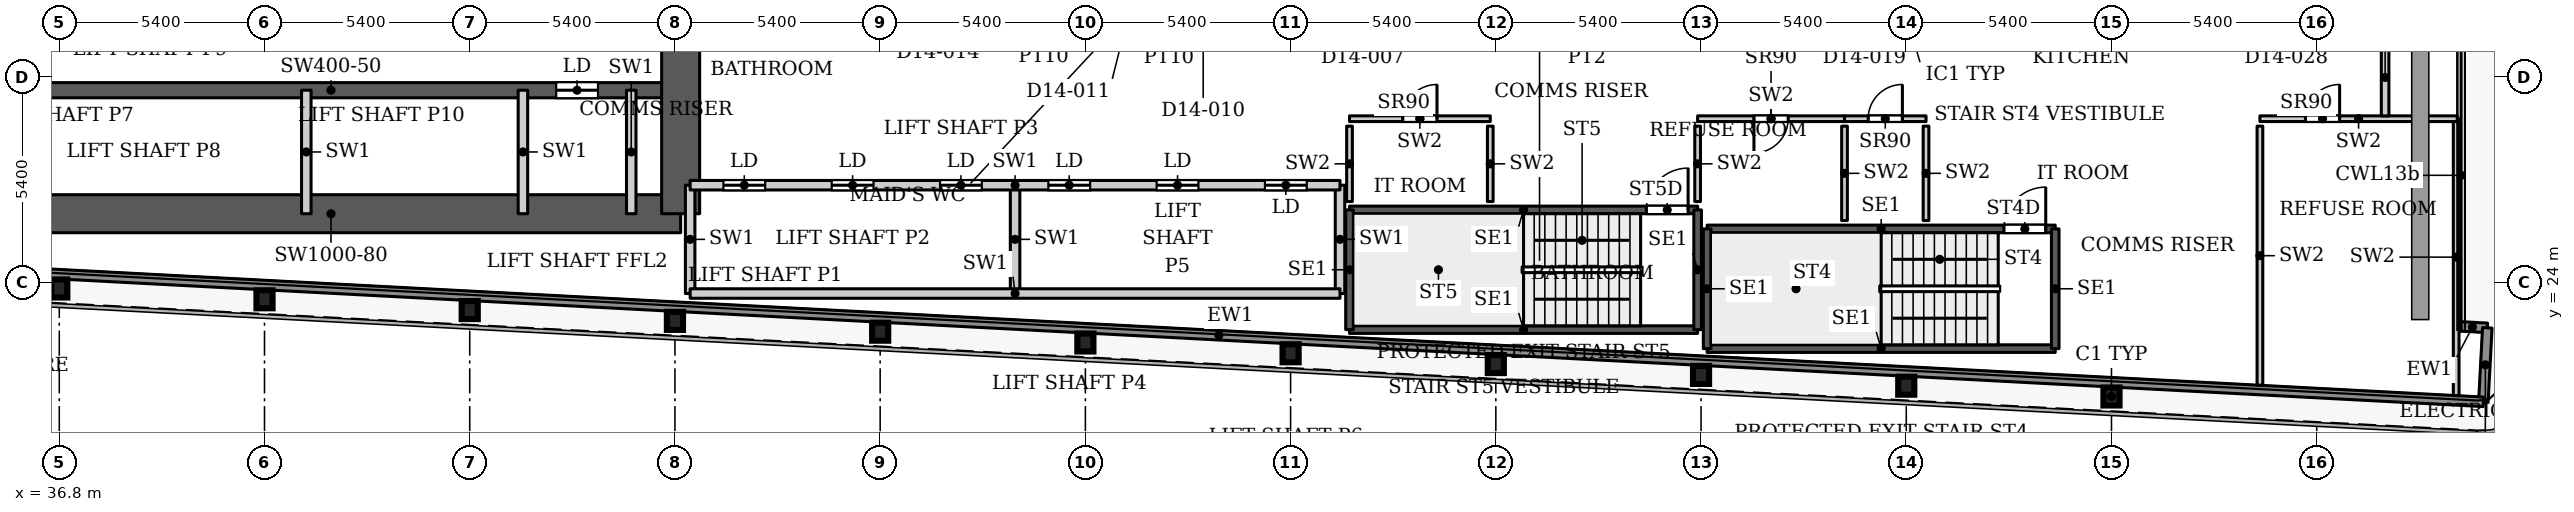
"""IFC4 building model, lengths in metres.
Left out: names, types, materials, properties, quantities, classifications, styles, units other than length and angle.
Written with IfcOpenShell. Run it as: python <this file> out.ifc"""

import sys

from ifc_helpers import new_model, si_unit, direction, frame, frame_2d, origin, origin_2d, place, context, subcontext, project, spatial, rectangle, i_section, extrude, source, transform, mapped, element, fill, save


model = new_model("IFC4")
c1 = context("Model", 3, precision=1e-05, world=origin(), true_north=direction((0.0, 1.0)))
c2 = subcontext(c1, "Body", "Model", "MODEL_VIEW")
j1 = project(units=[si_unit("LENGTHUNIT", "METRE"), si_unit("PLANEANGLEUNIT", "RADIAN")], contexts=[c1])
p1 = place(None, origin())
s1 = spatial("IfcSite", under=j1, at=p1, CompositionType="ELEMENT")
p2 = place(p1, origin())
s2 = spatial("IfcBuilding", under=s1, at=p2, CompositionType="ELEMENT")
p3 = place(p2, frame((0.0, 0.0, 61.7)))
s3 = spatial("IfcBuildingStorey", under=s2, at=p3, CompositionType="ELEMENT", Elevation=61.7)
for number, where, z_axis, x_axis in (
    (1, (90.8, 20.99, 0.0), (0.0, 0.0, 1.0), (1.0, 0.0, 0.0)),
    (2, (85.4, 21.274, 0.0), (0.0, 0.0, 1.0), (1.0, 0.0, 0.0)),
    (3, (80.0, 21.558, 0.0), (0.0, 0.0, 1.0), (1.0, 0.0, 0.0)),
    (4, (74.6, 21.843, 0.0), (0.0, 0.0, 1.0), (1.0, 0.0, 0.0)),
    (5, (69.2, 22.127, 0.0), (0.0, 0.0, 1.0), (1.0, 0.0, 0.0)),
    (6, (63.8, 22.411, 0.0), (0.0, 0.0, 1.0), (1.0, 0.0, 0.0)),
    (7, (58.4, 22.695, 0.0), (0.0, 0.0, 1.0), (1.0, 0.0, 0.0)),
    (8, (53.0, 22.98, 0.0), (0.0, 0.0, 1.0), (1.0, 0.0, 0.0)),
    (9, (47.6, 23.264, 0.0), (0.0, 0.0, 1.0), (1.0, 0.0, 0.0)),
    (10, (42.2, 23.548, 0.0), (0.0, 0.0, 1.0), (1.0, 0.0, 0.0)),
    (11, (36.8, 23.832, 0.0), (0.0, 0.0, 1.0), (1.0, 0.0, 0.0)),
):
    element("IfcColumn", number, at=place(p3, frame(where, z_axis=z_axis, x_axis=x_axis)), inside=s3, PredefinedType="COLUMN", context=c2, shape_type="SweptSolid", body=[
        extrude(i_section(OverallWidth=0.424, OverallDepth=0.474, WebThickness=0.048, FlangeThickness=0.077, FilletRadius=0.014, at=origin_2d()), origin(), (0.0, 0.0, 1.0), 3.9),
    ])
p4 = place(p3, frame((34.75, 25.8, 0.0), z_axis=(0.0, 0.0, 1.0), x_axis=(1.0, 0.0, 0.0)))
e12 = element("IfcWall", 12, at=p4, inside=s3, PredefinedType="SHEAR", context=c2, shape_type="SweptSolid", body=[
    extrude(rectangle(XDim=18.4, YDim=1.0, at=frame_2d((9.2, 0.0))), origin(), (0.0, 0.0, 1.0), 3.9),
])
p5 = place(p3, frame((34.75, 29.05, 0.0), z_axis=(0.0, 0.0, 1.0), x_axis=(1.0, 0.0, 0.0)))
e13 = element("IfcWall", 13, at=p5, inside=s3, PredefinedType="SHEAR", context=c2, shape_type="SweptSolid", body=[
    extrude(rectangle(XDim=18.4, YDim=0.4, at=frame_2d((9.2, 0.0))), origin(), (0.0, 0.0, 1.0), 3.9),
])
p6 = place(p5, frame((15.125, 0.0, 0.0)))
e14 = element("IfcOpeningElement", 14, at=p6, cuts=e13, PredefinedType="OPENING", context=c2, shape_type="SweptSolid", body=[
    extrude(rectangle(XDim=1.1, YDim=2.2, at=frame_2d((0.55, 1.1))), frame((0.0, 0.21, 0.0), z_axis=(0.0, -1.0, 0.0), x_axis=(1.0, 0.0, 0.0)), (0.0, 0.0, 1.0), 0.42),
])
p7 = place(p3, frame((53.15, 25.8, 0.0), z_axis=(0.0, 0.0, 1.0), x_axis=(0.0, 1.0, 0.0)))
e15 = element("IfcWall", 15, at=p7, inside=s3, PredefinedType="SHEAR", context=c2, shape_type="SweptSolid", body=[
    extrude(rectangle(XDim=10.4, YDim=1.0, at=frame_2d((5.2, 0.0))), origin(), (0.0, 0.0, 1.0), 3.9),
])
p8 = place(p3, frame((99.907, 22.839, 0.0), z_axis=(0.0, 0.0, 1.0), x_axis=(0.998561284263, -0.053622398031, 0.0)))
e16 = element("IfcWall", 16, at=p8, inside=s3, PredefinedType="SOLIDWALL", context=c2, shape_type="SweptSolid", body=[
    extrude(rectangle(XDim=0.783, YDim=0.25, at=frame_2d((0.392, 0.0))), origin(), (0.0, 0.0, 1.0), 3.75),
])
p9 = place(p3, frame((100.689, 22.797, 0.0), z_axis=(0.0, 0.0, 1.0), x_axis=(-0.052841433274, -0.998602915542, 0.0)))
e17 = element("IfcWall", 17, at=p9, inside=s3, PredefinedType="SOLIDWALL", context=c2, shape_type="SweptSolid", body=[
    extrude(rectangle(XDim=1.95, YDim=0.25, at=frame_2d((0.975, 0.0))), origin(), (0.0, 0.0, 1.0), 3.75),
])
p10 = place(p3, frame((100.586, 20.85, 0.0), z_axis=(0.0, 0.0, 1.0), x_axis=(-0.99861746497, 0.052565755559, 0.0)))
e18 = element("IfcWall", 18, at=p10, inside=s3, PredefinedType="SOLIDWALL", context=c2, shape_type="SweptSolid", body=[
    extrude(rectangle(XDim=66.639, YDim=0.25, at=frame_2d((33.319, 0.0))), origin(), (0.0, 0.0, 1.0), 3.75),
])
p11 = place(p3, frame((80.16, 22.25, 0.0), z_axis=(0.0, 0.0, 1.0), x_axis=(1.0, 0.0, 0.0)))
e19 = element("IfcWall", 19, at=p11, inside=s3, PredefinedType="SHEAR", context=c2, shape_type="SweptSolid", body=[
    extrude(rectangle(XDim=9.16, YDim=0.2, at=frame_2d((4.58, 0.0))), origin(), (0.0, 0.0, 1.0), 3.9),
])
p12 = place(p3, frame((80.16, 25.4, 0.0), z_axis=(0.0, 0.0, 1.0), x_axis=(1.0, 0.0, 0.0)))
e20 = element("IfcWall", 20, at=p12, inside=s3, PredefinedType="SHEAR", context=c2, shape_type="SweptSolid", body=[
    extrude(rectangle(XDim=9.16, YDim=0.2, at=frame_2d((4.58, 0.0))), origin(), (0.0, 0.0, 1.0), 3.9),
])
p13 = place(p12, frame((7.81, 0.0, 0.0)))
e21 = element("IfcOpeningElement", 21, at=p13, cuts=e20, PredefinedType="OPENING", context=c2, shape_type="SweptSolid", body=[
    extrude(rectangle(XDim=1.1, YDim=2.2, at=frame_2d((0.55, 1.1))), frame((0.0, 0.11, 0.0), z_axis=(0.0, -1.0, 0.0), x_axis=(1.0, 0.0, 0.0)), (0.0, 0.0, 1.0), 0.22),
])
for number, where, z_axis, x_axis in (
    (22, (80.16, 22.25, 0.0), (0.0, 0.0, 1.0), (0.0, 1.0, 0.0)),
    (23, (89.32, 22.25, 0.0), (0.0, 0.0, 1.0), (0.0, 1.0, 0.0)),
):
    element("IfcWall", number, at=place(p3, frame(where, z_axis=z_axis, x_axis=x_axis)), inside=s3, PredefinedType="SHEAR", context=c2, shape_type="SweptSolid", body=[
        extrude(rectangle(XDim=3.15, YDim=0.2, at=frame_2d((1.575, 0.0))), origin(), (0.0, 0.0, 1.0), 3.9),
    ])
p14 = place(p3, frame((70.75, 22.75, 0.0), z_axis=(0.0, 0.0, 1.0), x_axis=(1.0, 0.0, 0.0)))
e24 = element("IfcWall", 24, at=p14, inside=s3, PredefinedType="SHEAR", context=c2, shape_type="SweptSolid", body=[
    extrude(rectangle(XDim=9.16, YDim=0.2, at=frame_2d((4.58, 0.0))), origin(), (0.0, 0.0, 1.0), 3.9),
])
p15 = place(p3, frame((70.75, 25.9, 0.0), z_axis=(0.0, 0.0, 1.0), x_axis=(1.0, 0.0, 0.0)))
e25 = element("IfcWall", 25, at=p15, inside=s3, PredefinedType="SHEAR", context=c2, shape_type="SweptSolid", body=[
    extrude(rectangle(XDim=9.16, YDim=0.2, at=frame_2d((4.58, 0.0))), origin(), (0.0, 0.0, 1.0), 3.9),
])
p16 = place(p15, frame((7.81, 0.0, 0.0)))
e26 = element("IfcOpeningElement", 26, at=p16, cuts=e25, PredefinedType="OPENING", context=c2, shape_type="SweptSolid", body=[
    extrude(rectangle(XDim=1.1, YDim=2.2, at=frame_2d((0.55, 1.1))), frame((0.0, 0.11, 0.0), z_axis=(0.0, -1.0, 0.0), x_axis=(1.0, 0.0, 0.0)), (0.0, 0.0, 1.0), 0.22),
])
for number, where, z_axis, x_axis in (
    (27, (70.75, 22.75, 0.0), (0.0, 0.0, 1.0), (0.0, 1.0, 0.0)),
    (28, (79.91, 22.75, 0.0), (0.0, 0.0, 1.0), (0.0, 1.0, 0.0)),
):
    element("IfcWall", number, at=place(p3, frame(where, z_axis=z_axis, x_axis=x_axis)), inside=s3, PredefinedType="SHEAR", context=c2, shape_type="SweptSolid", body=[
        extrude(rectangle(XDim=3.15, YDim=0.2, at=frame_2d((1.575, 0.0))), origin(), (0.0, 0.0, 1.0), 3.9),
    ])
for number, where, z_axis, x_axis in (
    (29, (43.3, 25.8, 0.0), (0.0, 0.0, 1.0), (0.0, 1.0, 0.0)),
    (30, (49.0, 25.8, 0.0), (0.0, 0.0, 1.0), (0.0, 1.0, 0.0)),
    (31, (51.85, 25.8, 0.0), (0.0, 0.0, 1.0), (0.0, 1.0, 0.0)),
):
    element("IfcWall", number, at=place(p3, frame(where, z_axis=z_axis, x_axis=x_axis)), inside=s3, PredefinedType="PARTITIONING", context=c2, shape_type="SweptSolid", body=[
        extrude(rectangle(XDim=3.25, YDim=0.25, at=frame_2d((1.625, 0.0))), origin(), (0.0, 0.0, 1.0), 3.9),
    ])
for number, where, z_axis, x_axis in (
    (32, (53.4, 23.7, 0.0), (0.0, 0.0, 1.0), (0.0, 1.0, 0.0)),
    (33, (61.95, 23.7, 0.0), (0.0, 0.0, 1.0), (0.0, 1.0, 0.0)),
    (34, (70.5, 23.7, 0.0), (0.0, 0.0, 1.0), (0.0, 1.0, 0.0)),
):
    element("IfcWall", number, at=place(p3, frame(where, z_axis=z_axis, x_axis=x_axis)), inside=s3, PredefinedType="PARTITIONING", context=c2, shape_type="SweptSolid", body=[
        extrude(rectangle(XDim=2.85, YDim=0.25, at=frame_2d((1.425, 0.0))), origin(), (0.0, 0.0, 1.0), 3.9),
    ])
p17 = place(p3, frame((53.4, 23.7, 0.0), z_axis=(0.0, 0.0, 1.0), x_axis=(1.0, 0.0, 0.0)))
e35 = element("IfcWall", 35, at=p17, inside=s3, PredefinedType="PARTITIONING", context=c2, shape_type="SweptSolid", body=[
    extrude(rectangle(XDim=17.1, YDim=0.25, at=frame_2d((8.55, 0.0))), origin(), (0.0, 0.0, 1.0), 3.9),
])
p18 = place(p3, frame((53.4, 26.55, 0.0), z_axis=(0.0, 0.0, 1.0), x_axis=(1.0, 0.0, 0.0)))
e36 = element("IfcWall", 36, at=p18, inside=s3, PredefinedType="PARTITIONING", context=c2, shape_type="SweptSolid", body=[
    extrude(rectangle(XDim=17.1, YDim=0.25, at=frame_2d((8.55, 0.0))), origin(), (0.0, 0.0, 1.0), 3.9),
])
p19 = place(p18, frame((0.875, 0.0, 0.0)))
e37 = element("IfcOpeningElement", 37, at=p19, cuts=e36, PredefinedType="OPENING", context=c2, shape_type="SweptSolid", body=[
    extrude(rectangle(XDim=1.1, YDim=2.2, at=frame_2d((0.55, 1.1))), frame((0.0, 0.135, 0.0), z_axis=(0.0, -1.0, 0.0), x_axis=(1.0, 0.0, 0.0)), (0.0, 0.0, 1.0), 0.27),
])
p20 = place(p18, frame((3.725, 0.0, 0.0)))
e38 = element("IfcOpeningElement", 38, at=p20, cuts=e36, PredefinedType="OPENING", context=c2, shape_type="SweptSolid", body=[
    extrude(rectangle(XDim=1.1, YDim=2.2, at=frame_2d((0.55, 1.1))), frame((0.0, 0.135, 0.0), z_axis=(0.0, -1.0, 0.0), x_axis=(1.0, 0.0, 0.0)), (0.0, 0.0, 1.0), 0.27),
])
p21 = place(p18, frame((6.575, 0.0, 0.0)))
e39 = element("IfcOpeningElement", 39, at=p21, cuts=e36, PredefinedType="OPENING", context=c2, shape_type="SweptSolid", body=[
    extrude(rectangle(XDim=1.1, YDim=2.2, at=frame_2d((0.55, 1.1))), frame((0.0, 0.135, 0.0), z_axis=(0.0, -1.0, 0.0), x_axis=(1.0, 0.0, 0.0)), (0.0, 0.0, 1.0), 0.27),
])
p22 = place(p18, frame((9.425, 0.0, 0.0)))
e40 = element("IfcOpeningElement", 40, at=p22, cuts=e36, PredefinedType="OPENING", context=c2, shape_type="SweptSolid", body=[
    extrude(rectangle(XDim=1.1, YDim=2.2, at=frame_2d((0.55, 1.1))), frame((0.0, 0.135, 0.0), z_axis=(0.0, -1.0, 0.0), x_axis=(1.0, 0.0, 0.0)), (0.0, 0.0, 1.0), 0.27),
])
p23 = place(p18, frame((12.275, 0.0, 0.0)))
e41 = element("IfcOpeningElement", 41, at=p23, cuts=e36, PredefinedType="OPENING", context=c2, shape_type="SweptSolid", body=[
    extrude(rectangle(XDim=1.1, YDim=2.2, at=frame_2d((0.55, 1.1))), frame((0.0, 0.135, 0.0), z_axis=(0.0, -1.0, 0.0), x_axis=(1.0, 0.0, 0.0)), (0.0, 0.0, 1.0), 0.27),
])
p24 = place(p18, frame((15.125, 0.0, 0.0)))
e42 = element("IfcOpeningElement", 42, at=p24, cuts=e36, PredefinedType="OPENING", context=c2, shape_type="SweptSolid", body=[
    extrude(rectangle(XDim=1.1, YDim=2.2, at=frame_2d((0.55, 1.1))), frame((0.0, 0.135, 0.0), z_axis=(0.0, -1.0, 0.0), x_axis=(1.0, 0.0, 0.0)), (0.0, 0.0, 1.0), 0.27),
])
p25 = place(p3, frame((70.75, 28.3, 0.0), z_axis=(0.0, 0.0, 1.0), x_axis=(1.0, 0.0, 0.0)))
e43 = element("IfcWall", 43, at=p25, inside=s3, PredefinedType="PARTITIONING", context=c2, shape_type="SweptSolid", body=[
    extrude(rectangle(XDim=3.704, YDim=0.15, at=frame_2d((1.852, 0.0))), origin(), (0.0, 0.0, 1.0), 3.9),
])
p26 = place(p25, frame((1.402, 0.0, 0.0)))
e44 = element("IfcOpeningElement", 44, at=p26, cuts=e43, PredefinedType="OPENING", context=c2, shape_type="SweptSolid", body=[
    extrude(rectangle(XDim=0.9, YDim=2.2, at=frame_2d((0.45, 1.1))), frame((0.0, 0.085, 0.0), z_axis=(0.0, -1.0, 0.0), x_axis=(1.0, 0.0, 0.0)), (0.0, 0.0, 1.0), 0.17),
])
for number, where, z_axis, x_axis in (
    (45, (70.75, 26.12, 0.0), (0.0, 0.0, 1.0), (0.0, 1.0, 0.0)),
    (46, (74.454, 26.12, 0.0), (0.0, 0.0, 1.0), (0.0, 1.0, 0.0)),
):
    element("IfcWall", number, at=place(p3, frame(where, z_axis=z_axis, x_axis=x_axis)), inside=s3, PredefinedType="PARTITIONING", context=c2, shape_type="SweptSolid", body=[
        extrude(rectangle(XDim=1.985, YDim=0.15, at=frame_2d((0.992, 0.0))), origin(), (0.0, 0.0, 1.0), 3.9),
    ])
p27 = place(p3, frame((79.91, 28.3, 0.0), z_axis=(0.0, 0.0, 1.0), x_axis=(1.0, 0.0, 0.0)))
e47 = element("IfcWall", 47, at=p27, inside=s3, PredefinedType="PARTITIONING", context=c2, shape_type="SweptSolid", body=[
    extrude(rectangle(XDim=3.865, YDim=0.15, at=frame_2d((1.933, 0.0))), origin(), (0.0, 0.0, 1.0), 3.9),
])
p28 = place(p27, frame((1.482, 0.0, 0.0)))
e48 = element("IfcOpeningElement", 48, at=p28, cuts=e47, PredefinedType="OPENING", context=c2, shape_type="SweptSolid", body=[
    extrude(rectangle(XDim=0.9, YDim=2.2, at=frame_2d((0.45, 1.1))), frame((0.0, 0.085, 0.0), z_axis=(0.0, -1.0, 0.0), x_axis=(1.0, 0.0, 0.0)), (0.0, 0.0, 1.0), 0.17),
])
p29 = place(p3, frame((79.91, 26.12, 0.0), z_axis=(0.0, 0.0, 1.0), x_axis=(0.0, 1.0, 0.0)))
e49 = element("IfcWall", 49, at=p29, inside=s3, PredefinedType="PARTITIONING", context=c2, shape_type="SweptSolid", body=[
    extrude(rectangle(XDim=1.985, YDim=0.15, at=frame_2d((0.992, 0.0))), origin(), (0.0, 0.0, 1.0), 3.9),
])
p30 = place(p3, frame((83.775, 25.62, 0.0), z_axis=(0.0, 0.0, 1.0), x_axis=(0.0, 1.0, 0.0)))
e50 = element("IfcWall", 50, at=p30, inside=s3, PredefinedType="PARTITIONING", context=c2, shape_type="SweptSolid", body=[
    extrude(rectangle(XDim=2.485, YDim=0.15, at=frame_2d((1.242, 0.0))), origin(), (0.0, 0.0, 1.0), 3.9),
])
p31 = place(p3, frame((83.775, 28.3, 0.0), z_axis=(0.0, 0.0, 1.0), x_axis=(1.0, 0.0, 0.0)))
e51 = element("IfcWall", 51, at=p31, inside=s3, PredefinedType="PARTITIONING", context=c2, shape_type="SweptSolid", body=[
    extrude(rectangle(XDim=2.145, YDim=0.15, at=frame_2d((1.073, 0.0))), origin(), (0.0, 0.0, 1.0), 3.9),
])
p32 = place(p31, frame((0.623, 0.0, 0.0)))
e52 = element("IfcOpeningElement", 52, at=p32, cuts=e51, PredefinedType="OPENING", context=c2, shape_type="SweptSolid", body=[
    extrude(rectangle(XDim=0.9, YDim=2.2, at=frame_2d((0.45, 1.1))), frame((0.0, 0.085, 0.0), z_axis=(0.0, -1.0, 0.0), x_axis=(1.0, 0.0, 0.0)), (0.0, 0.0, 1.0), 0.17),
])
p33 = place(p3, frame((85.92, 25.62, 0.0), z_axis=(0.0, 0.0, 1.0), x_axis=(0.0, 1.0, 0.0)))
e53 = element("IfcWall", 53, at=p33, inside=s3, PredefinedType="PARTITIONING", context=c2, shape_type="SweptSolid", body=[
    extrude(rectangle(XDim=2.485, YDim=0.15, at=frame_2d((1.242, 0.0))), origin(), (0.0, 0.0, 1.0), 3.9),
])
p34 = place(p3, frame((99.87, 21.015, 0.0), z_axis=(0.0, 0.0, 1.0), x_axis=(0.0, 1.0, 0.0)))
e54 = element("IfcWall", 54, at=p34, inside=s3, PredefinedType="PARTITIONING", context=c2, shape_type="SweptSolid", body=[
    extrude(rectangle(XDim=7.285, YDim=0.15, at=frame_2d((3.643, 0.0))), origin(), (0.0, 0.0, 1.0), 3.9),
])
p35 = place(p3, frame((94.706, 28.3, 0.0), z_axis=(0.0, 0.0, 1.0), x_axis=(1.0, 0.0, 0.0)))
e55 = element("IfcWall", 55, at=p35, inside=s3, PredefinedType="PARTITIONING", context=c2, shape_type="SweptSolid", body=[
    extrude(rectangle(XDim=5.192, YDim=0.15, at=frame_2d((2.596, 0.0))), origin(), (0.0, 0.0, 1.0), 3.9),
])
p36 = place(p35, frame((1.197, 0.0, 0.0)))
e56 = element("IfcOpeningElement", 56, at=p36, cuts=e55, PredefinedType="OPENING", context=c2, shape_type="SweptSolid", body=[
    extrude(rectangle(XDim=0.9, YDim=2.2, at=frame_2d((0.45, 1.1))), frame((0.0, 0.085, 0.0), z_axis=(0.0, -1.0, 0.0), x_axis=(1.0, 0.0, 0.0)), (0.0, 0.0, 1.0), 0.17),
])
p37 = place(p3, frame((94.706, 21.287, 0.0), z_axis=(0.0, 0.0, 1.0), x_axis=(0.0, 1.0, 0.0)))
e57 = element("IfcWall", 57, at=p37, inside=s3, PredefinedType="PARTITIONING", context=c2, shape_type="SweptSolid", body=[
    extrude(rectangle(XDim=6.818, YDim=0.15, at=frame_2d((3.409, 0.0))), origin(), (0.0, 0.0, 1.0), 3.9),
])
p38 = place(p3, frame((98.0, 28.374, 0.0), z_axis=(0.0, 0.0, 1.0), x_axis=(0.0, 1.0, 0.0)))
e58 = element("IfcWall", 58, at=p38, inside=s3, PredefinedType="PARTITIONING", context=c2, shape_type="SweptSolid", body=[
    extrude(rectangle(XDim=2.026, YDim=0.2, at=frame_2d((1.013, 0.0))), origin(), (0.0, 0.0, 1.0), 3.6),
])
m1 = source(origin(), c2, "Body", "SweptSolid", [
    extrude(rectangle(XDim=1.1, YDim=2.2, at=frame_2d((0.55, 1.1))), frame((0.0, 0.025, 0.0), z_axis=(0.0, -1.0, 0.0), x_axis=(1.0, 0.0, 0.0)), (0.0, 0.0, 1.0), 0.05),
])
p39 = place(p19, origin())
e59 = element("IfcDoor", 59, at=p39, inside=s3, OperationType="SLIDING_TO_LEFT", PredefinedType="DOOR", context=c2, shape_type="MappedRepresentation", body=[
    mapped(m1, transform((0.0, 0.0, 0.0), x_axis=(1.0, 0.0, 0.0), y_axis=(0.0, 1.0, 0.0), z_axis=(0.0, 0.0, 1.0), scale=1.0)),
])
fill(e37, e59)
p40 = place(p20, origin())
e60 = element("IfcDoor", 60, at=p40, inside=s3, OperationType="SLIDING_TO_LEFT", PredefinedType="DOOR", context=c2, shape_type="MappedRepresentation", body=[
    mapped(m1, transform((0.0, 0.0, 0.0), x_axis=(1.0, 0.0, 0.0), y_axis=(0.0, 1.0, 0.0), z_axis=(0.0, 0.0, 1.0), scale=1.0)),
])
fill(e38, e60)
p41 = place(p21, origin())
e61 = element("IfcDoor", 61, at=p41, inside=s3, OperationType="SLIDING_TO_LEFT", PredefinedType="DOOR", context=c2, shape_type="MappedRepresentation", body=[
    mapped(m1, transform((0.0, 0.0, 0.0), x_axis=(1.0, 0.0, 0.0), y_axis=(0.0, 1.0, 0.0), z_axis=(0.0, 0.0, 1.0), scale=1.0)),
])
fill(e39, e61)
p42 = place(p22, origin())
e62 = element("IfcDoor", 62, at=p42, inside=s3, OperationType="SLIDING_TO_LEFT", PredefinedType="DOOR", context=c2, shape_type="MappedRepresentation", body=[
    mapped(m1, transform((0.0, 0.0, 0.0), x_axis=(1.0, 0.0, 0.0), y_axis=(0.0, 1.0, 0.0), z_axis=(0.0, 0.0, 1.0), scale=1.0)),
])
fill(e40, e62)
p43 = place(p23, origin())
e63 = element("IfcDoor", 63, at=p43, inside=s3, OperationType="SLIDING_TO_LEFT", PredefinedType="DOOR", context=c2, shape_type="MappedRepresentation", body=[
    mapped(m1, transform((0.0, 0.0, 0.0), x_axis=(1.0, 0.0, 0.0), y_axis=(0.0, 1.0, 0.0), z_axis=(0.0, 0.0, 1.0), scale=1.0)),
])
fill(e41, e63)
p44 = place(p24, origin())
e64 = element("IfcDoor", 64, at=p44, inside=s3, OperationType="SLIDING_TO_LEFT", PredefinedType="DOOR", context=c2, shape_type="MappedRepresentation", body=[
    mapped(m1, transform((0.0, 0.0, 0.0), x_axis=(1.0, 0.0, 0.0), y_axis=(0.0, 1.0, 0.0), z_axis=(0.0, 0.0, 1.0), scale=1.0)),
])
fill(e42, e64)
p45 = place(p6, origin())
e65 = element("IfcDoor", 65, at=p45, inside=s3, OperationType="SLIDING_TO_LEFT", PredefinedType="DOOR", context=c2, shape_type="MappedRepresentation", body=[
    mapped(m1, transform((0.0, 0.0, 0.0), x_axis=(1.0, 0.0, 0.0), y_axis=(0.0, 1.0, 0.0), z_axis=(0.0, 0.0, 1.0), scale=1.0)),
])
fill(e14, e65)
m2 = source(origin(), c2, "Body", "SweptSolid", [
    extrude(rectangle(XDim=0.9, YDim=2.2, at=frame_2d((0.45, 1.1))), frame((0.0, 0.025, 0.0), z_axis=(0.0, -1.0, 0.0), x_axis=(1.0, 0.0, 0.0)), (0.0, 0.0, 1.0), 0.05),
])
p46 = place(p26, origin())
e66 = element("IfcDoor", 66, at=p46, inside=s3, OperationType="SINGLE_SWING_LEFT", PredefinedType="DOOR", context=c2, shape_type="MappedRepresentation", body=[
    mapped(m2, transform((0.0, 0.0, 0.0), x_axis=(1.0, 0.0, 0.0), y_axis=(0.0, 1.0, 0.0), z_axis=(0.0, 0.0, 1.0), scale=1.0)),
])
fill(e44, e66)
p47 = place(p28, origin())
e67 = element("IfcDoor", 67, at=p47, inside=s3, OperationType="SINGLE_SWING_RIGHT", PredefinedType="DOOR", context=c2, shape_type="MappedRepresentation", body=[
    mapped(m2, transform((0.0, 0.0, 0.0), x_axis=(1.0, 0.0, 0.0), y_axis=(0.0, 1.0, 0.0), z_axis=(0.0, 0.0, 1.0), scale=1.0)),
])
fill(e48, e67)
p48 = place(p32, origin())
e68 = element("IfcDoor", 68, at=p48, inside=s3, OperationType="SINGLE_SWING_LEFT", PredefinedType="DOOR", context=c2, shape_type="MappedRepresentation", body=[
    mapped(m2, transform((0.0, 0.0, 0.0), x_axis=(1.0, 0.0, 0.0), y_axis=(0.0, 1.0, 0.0), z_axis=(0.0, 0.0, 1.0), scale=1.0)),
])
fill(e52, e68)
p49 = place(p36, origin())
e69 = element("IfcDoor", 69, at=p49, inside=s3, OperationType="SINGLE_SWING_LEFT", PredefinedType="DOOR", context=c2, shape_type="MappedRepresentation", body=[
    mapped(m2, transform((0.0, 0.0, 0.0), x_axis=(1.0, 0.0, 0.0), y_axis=(0.0, 1.0, 0.0), z_axis=(0.0, 0.0, 1.0), scale=1.0)),
])
fill(e56, e69)
m3 = source(origin(), c2, "Body", "SweptSolid", [
    extrude(rectangle(XDim=1.1, YDim=2.2, at=frame_2d((0.55, 1.1))), frame((0.0, 0.025, 0.0), z_axis=(0.0, -1.0, 0.0), x_axis=(1.0, 0.0, 0.0)), (0.0, 0.0, 1.0), 0.05),
])
p50 = place(p13, origin())
e70 = element("IfcDoor", 70, at=p50, inside=s3, OperationType="SINGLE_SWING_LEFT", PredefinedType="DOOR", context=c2, shape_type="MappedRepresentation", body=[
    mapped(m3, transform((0.0, 0.0, 0.0), x_axis=(1.0, 0.0, 0.0), y_axis=(0.0, 1.0, 0.0), z_axis=(0.0, 0.0, 1.0), scale=1.0)),
])
fill(e21, e70)
p51 = place(p16, origin())
e71 = element("IfcDoor", 71, at=p51, inside=s3, OperationType="SINGLE_SWING_LEFT", PredefinedType="DOOR", context=c2, shape_type="MappedRepresentation", body=[
    mapped(m3, transform((0.0, 0.0, 0.0), x_axis=(1.0, 0.0, 0.0), y_axis=(0.0, 1.0, 0.0), z_axis=(0.0, 0.0, 1.0), scale=1.0)),
])
fill(e26, e71)
save(model, sys.argv[1])
